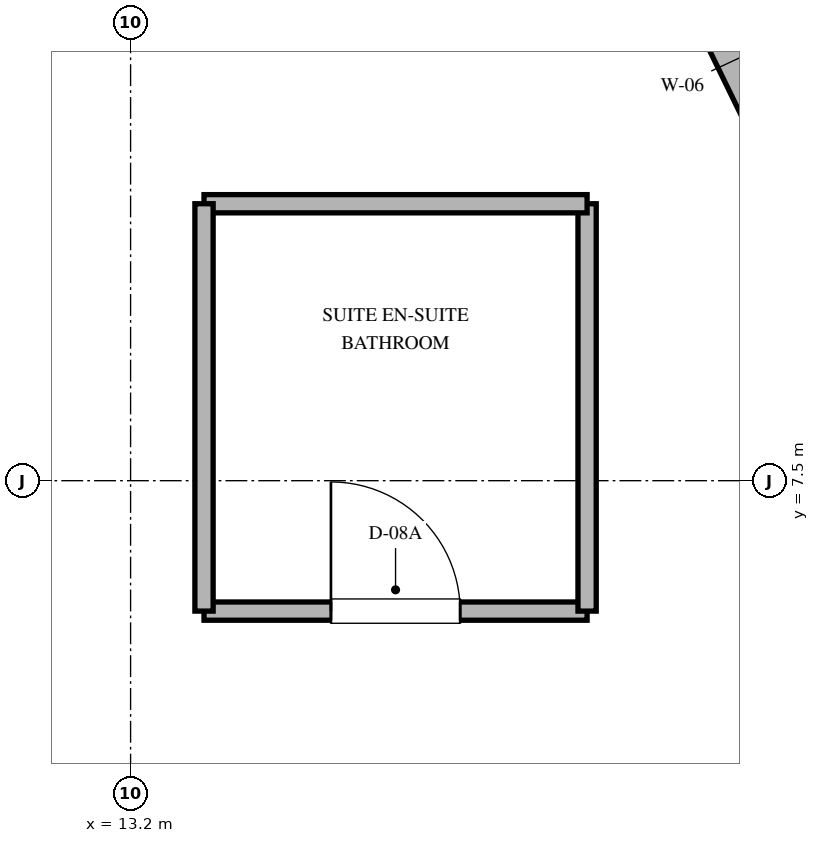
"""IFC4 building model, lengths in metres.
Left out: names, types, materials, properties, quantities, classifications, styles, units other than length and angle.
Written with IfcOpenShell. Run it as: python <this file> out.ifc"""

import sys

from ifc_helpers import new_model, si_unit, direction, frame, frame_2d, origin, place, context, subcontext, project, spatial, rectangle, extrude, element, fill, save


model = new_model("IFC4")
c1 = context("Model", 3, precision=1e-05, world=origin(), true_north=direction((0.0, 1.0)))
c2 = subcontext(c1, "Body", "Model", "MODEL_VIEW")
j1 = project(units=[si_unit("LENGTHUNIT", "METRE"), si_unit("PLANEANGLEUNIT", "RADIAN")], contexts=[c1])
p1 = place(None, origin())
s1 = spatial("IfcSite", under=j1, at=p1, CompositionType="ELEMENT")
p2 = place(p1, origin())
s2 = spatial("IfcBuilding", under=s1, at=p2, CompositionType="ELEMENT")
p3 = place(p2, frame((0.0, 0.0, 297.6)))
s3 = spatial("IfcBuildingStorey", under=s2, at=p3, CompositionType="ELEMENT", Elevation=297.6)
p4 = place(p3, frame((21.138, 2.371, 0.0), z_axis=(0.0, 0.0, 1.0), x_axis=(-0.438128124058, 0.89891253574, 0.0)))
e1 = element("IfcWall", 1, at=p4, inside=s3, PredefinedType="SOLIDWALL", context=c2, shape_type="SweptSolid", body=[
    extrude(rectangle(XDim=17.565, YDim=0.45, at=frame_2d((8.782, 0.0))), origin(), (0.0, 0.0, 1.0), 3.6),
])
p5 = place(p4, frame((1.133, 0.0, 0.8)))
e2 = element("IfcOpeningElement", 2, at=p5, cuts=e1, PredefinedType="OPENING", context=c2, shape_type="SweptSolid", body=[
    extrude(rectangle(XDim=1.35, YDim=1.75, at=frame_2d((0.675, 0.875))), frame((0.0, 0.235, 0.0), z_axis=(0.0, -1.0, 0.0), x_axis=(1.0, 0.0, 0.0)), (0.0, 0.0, 1.0), 0.47),
])
p6 = place(p4, frame((8.158, 0.0, 0.8)))
e3 = element("IfcOpeningElement", 3, at=p6, cuts=e1, PredefinedType="OPENING", context=c2, shape_type="SweptSolid", body=[
    extrude(rectangle(XDim=1.35, YDim=1.75, at=frame_2d((0.675, 0.875))), frame((0.0, 0.235, 0.0), z_axis=(0.0, -1.0, 0.0), x_axis=(1.0, 0.0, 0.0)), (0.0, 0.0, 1.0), 0.47),
])
p7 = place(p4, frame((15.132, 0.0, 0.8)))
e4 = element("IfcOpeningElement", 4, at=p7, cuts=e1, PredefinedType="OPENING", context=c2, shape_type="SweptSolid", body=[
    extrude(rectangle(XDim=1.35, YDim=1.75, at=frame_2d((0.675, 0.875))), frame((0.0, 0.235, 0.0), z_axis=(0.0, -1.0, 0.0), x_axis=(1.0, 0.0, 0.0)), (0.0, 0.0, 1.0), 0.47),
])
p8 = place(p3, frame((9.672, 9.85, 0.0), z_axis=(0.0, 0.0, 1.0), x_axis=(0.700629771301, 0.713524998558, 0.0)))
e5 = element("IfcWall", 5, at=p8, inside=s3, PredefinedType="PARTITIONING", context=c2, shape_type="SweptSolid", body=[
    extrude(rectangle(XDim=7.459, YDim=0.15, at=frame_2d((3.73, 0.0))), origin(), (0.0, 0.0, 1.0), 2.94),
])
p9 = place(p3, frame((13.683, 6.642, 0.0), z_axis=(0.0, 0.0, 1.0), x_axis=(1.0, 0.0, 0.0)))
e6 = element("IfcWall", 6, at=p9, inside=s3, PredefinedType="PARTITIONING", context=c2, shape_type="SweptSolid", body=[
    extrude(rectangle(XDim=2.52, YDim=0.12, at=frame_2d((1.26, 0.0))), origin(), (0.0, 0.0, 1.0), 2.894),
])
p10 = place(p9, frame((0.835, 0.0, 0.0)))
e7 = element("IfcOpeningElement", 7, at=p10, cuts=e6, PredefinedType="OPENING", context=c2, shape_type="SweptSolid", body=[
    extrude(rectangle(XDim=0.85, YDim=2.03, at=frame_2d((0.425, 1.015))), frame((0.0, 0.07, 0.0), z_axis=(0.0, -1.0, 0.0), x_axis=(1.0, 0.0, 0.0)), (0.0, 0.0, 1.0), 0.14),
])
p11 = place(p3, frame((16.203, 6.642, 0.0), z_axis=(0.0, 0.0, 1.0), x_axis=(0.0, 1.0, 0.0)))
e8 = element("IfcWall", 8, at=p11, inside=s3, PredefinedType="PARTITIONING", context=c2, shape_type="SweptSolid", body=[
    extrude(rectangle(XDim=2.68, YDim=0.12, at=frame_2d((1.34, 0.0))), origin(), (0.0, 0.0, 1.0), 3.6),
])
p12 = place(p3, frame((16.203, 9.322, 0.0), z_axis=(0.0, 0.0, 1.0), x_axis=(-1.0, 0.0, 0.0)))
e9 = element("IfcWall", 9, at=p12, inside=s3, PredefinedType="PARTITIONING", context=c2, shape_type="SweptSolid", body=[
    extrude(rectangle(XDim=2.52, YDim=0.12, at=frame_2d((1.26, 0.0))), origin(), (0.0, 0.0, 1.0), 3.126),
])
p13 = place(p3, frame((13.683, 9.322, 0.0), z_axis=(0.0, 0.0, 1.0), x_axis=(0.0, -1.0, 0.0)))
e10 = element("IfcWall", 10, at=p13, inside=s3, PredefinedType="PARTITIONING", context=c2, shape_type="SweptSolid", body=[
    extrude(rectangle(XDim=2.68, YDim=0.12, at=frame_2d((1.34, 0.0))), origin(), (0.0, 0.0, 1.0), 3.172),
])
p14 = place(p6, origin())
e11 = element("IfcWindow", 11, at=p14, inside=s3, PartitioningType="SINGLE_PANEL", PredefinedType="WINDOW", context=c2, shape_type="SweptSolid", body=[
    extrude(rectangle(XDim=1.35, YDim=1.75, at=frame_2d((0.675, 0.875))), frame((0.0, 0.03, 0.0), z_axis=(0.0, -1.0, 0.0), x_axis=(1.0, 0.0, 0.0)), (0.0, 0.0, 1.0), 0.06),
])
fill(e3, e11)
p15 = place(p10, origin())
e12 = element("IfcDoor", 12, at=p15, inside=s3, OperationType="SINGLE_SWING_LEFT", PredefinedType="DOOR", context=c2, shape_type="SweptSolid", body=[
    extrude(rectangle(XDim=0.85, YDim=2.03, at=frame_2d((0.425, 1.015))), frame((0.0, 0.025, 0.0), z_axis=(0.0, -1.0, 0.0), x_axis=(1.0, 0.0, 0.0)), (0.0, 0.0, 1.0), 0.05),
])
fill(e7, e12)
save(model, sys.argv[1])
